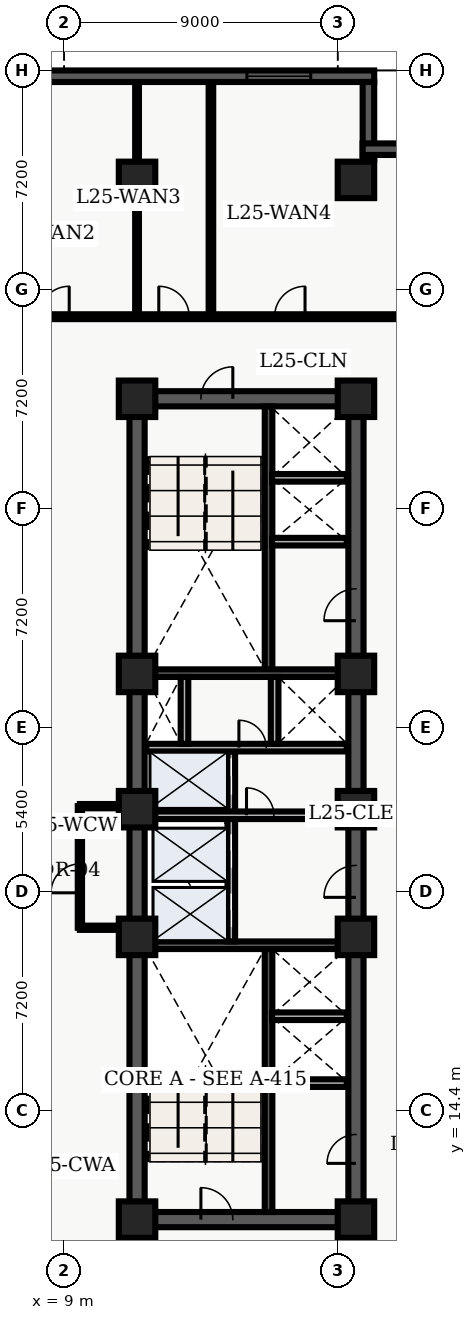
"""IFC4 building model, lengths in metres.
Left out: names, types, materials, properties, quantities, classifications, styles, units other than length and angle.
Written with IfcOpenShell. Run it as: python <this file> out.ifc"""

import sys

from ifc_helpers import new_model, entity, si_unit, converted_unit, direction, frame, origin_with_axes, origin_2d_with_axis, place, context, subcontext, project, spatial, polyline, rectangle, outline, extrude, element, fill, save


model = new_model("IFC4")
c1 = context("Model", 3, precision=1e-05, world=origin_with_axes(), true_north=direction((0.0, 1.0)))
c2 = subcontext(c1, "Body", "Model", "MODEL_VIEW")
j1 = project(units=[si_unit("LENGTHUNIT", "METRE"), converted_unit("PLANEANGLEUNIT", "DEGREE", entity("IfcPlaneAngleMeasure", 0.017), si_unit("PLANEANGLEUNIT", "RADIAN"), dimensions=[0, 0, 0, 0, 0, 0, 0])], contexts=[c1])
p1 = place(None, origin_with_axes())
s1 = spatial("IfcSite", under=j1, at=p1, CompositionType="ELEMENT")
p2 = place(p1, origin_with_axes())
s2 = spatial("IfcBuilding", under=s1, at=p2, CompositionType="ELEMENT")
p3 = place(p2, frame((0.0, 0.0, 104.7), z_axis=(0.0, 0.0, 1.0), x_axis=(1.0, 0.0, 0.0)))
s3 = spatial("IfcBuildingStorey", under=s2, at=p3, CompositionType="ELEMENT", Elevation=104.7)
p4 = place(p3, frame((11.4, 10.8, 0.0), z_axis=(0.0, 0.0, 1.0), x_axis=(0.0, 1.0, 0.0)))
e1 = element("IfcWall", 1, at=p4, inside=s3, PredefinedType="SHEAR", context=c2, shape_type="SweptSolid", body=[
    extrude(outline(polyline([(0.0, -0.25), (27.0, -0.25), (27.0, 0.25), (0.0, 0.25), (0.0, -0.25)])), origin_with_axes(), (0.0, 0.0, 1.0), 3.66),
])
p5 = place(p3, frame((11.4, 10.8, 0.0), z_axis=(0.0, 0.0, 1.0), x_axis=(1.0, 0.0, 0.0)))
e2 = element("IfcWall", 2, at=p5, inside=s3, PredefinedType="SHEAR", context=c2, shape_type="SweptSolid", body=[
    extrude(outline(polyline([(0.0, -0.25), (7.2, -0.25), (7.2, 0.25), (0.0, 0.25), (0.0, -0.25)])), origin_with_axes(), (0.0, 0.0, 1.0), 3.66),
])
p6 = place(p5, frame((2.625, 0.0, 0.0), z_axis=(0.0, 0.0, 1.0), x_axis=(1.0, 0.0, 0.0)))
e3 = element("IfcOpeningElement", 3, at=p6, cuts=e2, PredefinedType="OPENING", context=c2, shape_type="SweptSolid", body=[
    extrude(rectangle(XDim=1.05, YDim=0.52, at=origin_2d_with_axis()), origin_with_axes(), (0.0, 0.0, 1.0), 2.15),
])
p7 = place(p3, frame((11.4, 37.8, 0.0), z_axis=(0.0, 0.0, 1.0), x_axis=(1.0, 0.0, 0.0)))
e4 = element("IfcWall", 4, at=p7, inside=s3, PredefinedType="SHEAR", context=c2, shape_type="SweptSolid", body=[
    extrude(outline(polyline([(0.0, -0.25), (7.2, -0.25), (7.2, 0.25), (0.0, 0.25), (0.0, -0.25)])), origin_with_axes(), (0.0, 0.0, 1.0), 3.66),
])
p8 = place(p7, frame((2.625, 0.0, 0.0), z_axis=(0.0, 0.0, 1.0), x_axis=(1.0, 0.0, 0.0)))
e5 = element("IfcOpeningElement", 5, at=p8, cuts=e4, PredefinedType="OPENING", context=c2, shape_type="SweptSolid", body=[
    extrude(rectangle(XDim=1.05, YDim=0.52, at=origin_2d_with_axis()), origin_with_axes(), (0.0, 0.0, 1.0), 2.15),
])
p9 = place(p3, frame((18.6, 10.8, 0.0), z_axis=(0.0, 0.0, 1.0), x_axis=(0.0, 1.0, 0.0)))
e6 = element("IfcWall", 6, at=p9, inside=s3, PredefinedType="SHEAR", context=c2, shape_type="SweptSolid", body=[
    extrude(outline(polyline([(0.0, -0.25), (13.5, -0.25), (13.5, 0.25), (0.0, 0.25), (0.0, -0.25)])), origin_with_axes(), (0.0, 0.0, 1.0), 3.66),
])
p10 = place(p9, frame((11.125, 0.0, 0.0), z_axis=(0.0, 0.0, 1.0), x_axis=(1.0, 0.0, 0.0)))
e7 = element("IfcOpeningElement", 7, at=p10, cuts=e6, PredefinedType="OPENING", context=c2, shape_type="SweptSolid", body=[
    extrude(rectangle(XDim=1.05, YDim=0.52, at=origin_2d_with_axis()), origin_with_axes(), (0.0, 0.0, 1.0), 2.15),
])
p11 = place(p9, frame((2.325, 0.0, 0.0), z_axis=(0.0, 0.0, 1.0), x_axis=(1.0, 0.0, 0.0)))
e8 = element("IfcOpeningElement", 8, at=p11, cuts=e6, PredefinedType="OPENING", context=c2, shape_type="SweptSolid", body=[
    extrude(rectangle(XDim=0.95, YDim=0.52, at=origin_2d_with_axis()), origin_with_axes(), (0.0, 0.0, 1.0), 2.15),
])
p12 = place(p3, frame((18.6, 24.3, 0.0), z_axis=(0.0, 0.0, 1.0), x_axis=(0.0, 1.0, 0.0)))
e9 = element("IfcWall", 9, at=p12, inside=s3, PredefinedType="SHEAR", context=c2, shape_type="SweptSolid", body=[
    extrude(outline(polyline([(0.0, -0.25), (13.5, -0.25), (13.5, 0.25), (0.0, 0.25), (0.0, -0.25)])), origin_with_axes(), (0.0, 0.0, 1.0), 3.66),
])
p13 = place(p12, frame((6.725, 0.0, 0.0), z_axis=(0.0, 0.0, 1.0), x_axis=(1.0, 0.0, 0.0)))
e10 = element("IfcOpeningElement", 10, at=p13, cuts=e9, PredefinedType="OPENING", context=c2, shape_type="SweptSolid", body=[
    extrude(rectangle(XDim=1.05, YDim=0.52, at=origin_2d_with_axis()), origin_with_axes(), (0.0, 0.0, 1.0), 2.15),
])
p14 = place(p3, frame((15.725, 11.05, 0.0), z_axis=(0.0, 0.0, 1.0), x_axis=(0.0, 1.0, 0.0)))
e11 = element("IfcWall", 11, at=p14, inside=s3, PredefinedType="SHEAR", context=c2, shape_type="SweptSolid", body=[
    extrude(outline(polyline([(0.0, -0.125), (8.65, -0.125), (8.65, 0.125), (0.0, 0.125), (0.0, -0.125)])), origin_with_axes(), (0.0, 0.0, 1.0), 3.66),
])
p15 = place(p3, frame((11.65, 19.825, 0.0), z_axis=(0.0, 0.0, 1.0), x_axis=(1.0, 0.0, 0.0)))
e12 = element("IfcWall", 12, at=p15, inside=s3, PredefinedType="SHEAR", context=c2, shape_type="SweptSolid", body=[
    extrude(outline(polyline([(0.0, -0.125), (6.7, -0.125), (6.7, 0.125), (0.0, 0.125), (0.0, -0.125)])), origin_with_axes(), (0.0, 0.0, 1.0), 3.66),
])
p16 = place(p3, frame((15.725, 28.9, 0.0), z_axis=(0.0, 0.0, 1.0), x_axis=(0.0, 1.0, 0.0)))
e13 = element("IfcWall", 13, at=p16, inside=s3, PredefinedType="SHEAR", context=c2, shape_type="SweptSolid", body=[
    extrude(outline(polyline([(0.0, -0.125), (8.65, -0.125), (8.65, 0.125), (0.0, 0.125), (0.0, -0.125)])), origin_with_axes(), (0.0, 0.0, 1.0), 3.66),
])
p17 = place(p3, frame((11.65, 28.775, 0.0), z_axis=(0.0, 0.0, 1.0), x_axis=(1.0, 0.0, 0.0)))
e14 = element("IfcWall", 14, at=p17, inside=s3, PredefinedType="SHEAR", context=c2, shape_type="SweptSolid", body=[
    extrude(outline(polyline([(0.0, -0.125), (6.7, -0.125), (6.7, 0.125), (0.0, 0.125), (0.0, -0.125)])), origin_with_axes(), (0.0, 0.0, 1.0), 3.66),
])
p18 = place(p3, frame((14.5, 19.95, 0.0), z_axis=(0.0, 0.0, 1.0), x_axis=(0.0, 1.0, 0.0)))
e15 = element("IfcWall", 15, at=p18, inside=s3, PredefinedType="SOLIDWALL", context=c2, shape_type="SweptSolid", body=[
    extrude(outline(polyline([(0.0, -0.125), (6.25, -0.125), (6.25, 0.125), (0.0, 0.125), (0.0, -0.125)])), origin_with_axes(), (0.0, 0.0, 1.0), 2.7),
])
p19 = place(p18, frame((1.025, 0.0, 0.0), z_axis=(0.0, 0.0, 1.0), x_axis=(1.0, 0.0, 0.0)))
e16 = element("IfcOpeningElement", 16, at=p19, cuts=e15, PredefinedType="OPENING", context=c2, shape_type="SweptSolid", body=[
    extrude(rectangle(XDim=1.1, YDim=0.27, at=origin_2d_with_axis()), origin_with_axes(), (0.0, 0.0, 1.0), 2.15),
])
p20 = place(p18, frame((2.975, 0.0, 0.0), z_axis=(0.0, 0.0, 1.0), x_axis=(1.0, 0.0, 0.0)))
e17 = element("IfcOpeningElement", 17, at=p20, cuts=e15, PredefinedType="OPENING", context=c2, shape_type="SweptSolid", body=[
    extrude(rectangle(XDim=1.1, YDim=0.27, at=origin_2d_with_axis()), origin_with_axes(), (0.0, 0.0, 1.0), 2.15),
])
p21 = place(p18, frame((5.425, 0.0, 0.0), z_axis=(0.0, 0.0, 1.0), x_axis=(1.0, 0.0, 0.0)))
e18 = element("IfcOpeningElement", 18, at=p21, cuts=e15, PredefinedType="OPENING", context=c2, shape_type="SweptSolid", body=[
    extrude(rectangle(XDim=1.2, YDim=0.27, at=origin_2d_with_axis()), origin_with_axes(), (0.0, 0.0, 1.0), 2.15),
])
p22 = place(p3, frame((11.7, 24.1, 0.0), z_axis=(0.0, 0.0, 1.0), x_axis=(1.0, 0.0, 0.0)))
e19 = element("IfcWall", 19, at=p22, inside=s3, PredefinedType="SOLIDWALL", context=c2, shape_type="SweptSolid", body=[
    extrude(outline(polyline([(0.0, -0.125), (6.6, -0.125), (6.6, 0.125), (0.0, 0.125), (0.0, -0.125)])), origin_with_axes(), (0.0, 0.0, 1.0), 2.7),
])
p23 = place(p22, frame((3.75, 0.0, 0.0), z_axis=(0.0, 0.0, 1.0), x_axis=(1.0, 0.0, 0.0)))
e20 = element("IfcOpeningElement", 20, at=p23, cuts=e19, PredefinedType="OPENING", context=c2, shape_type="SweptSolid", body=[
    extrude(rectangle(XDim=0.9, YDim=0.27, at=origin_2d_with_axis()), origin_with_axes(), (0.0, 0.0, 1.0), 2.15),
])
p24 = place(p3, frame((11.7, 26.325, 0.0), z_axis=(0.0, 0.0, 1.0), x_axis=(1.0, 0.0, 0.0)))
e21 = element("IfcWall", 21, at=p24, inside=s3, PredefinedType="SOLIDWALL", context=c2, shape_type="SweptSolid", body=[
    extrude(outline(polyline([(0.0, -0.125), (6.6, -0.125), (6.6, 0.125), (0.0, 0.125), (0.0, -0.125)])), origin_with_axes(), (0.0, 0.0, 1.0), 2.7),
])
p25 = place(p24, frame((3.5, 0.0, 0.0), z_axis=(0.0, 0.0, 1.0), x_axis=(1.0, 0.0, 0.0)))
e22 = element("IfcOpeningElement", 22, at=p25, cuts=e21, PredefinedType="OPENING", context=c2, shape_type="SweptSolid", body=[
    extrude(rectangle(XDim=0.9, YDim=0.27, at=origin_2d_with_axis()), origin_with_axes(), (0.0, 0.0, 1.0), 2.15),
])
for number, where, z_axis, x_axis in (
    (23, (12.96, 26.45, 0.0), (0.0, 0.0, 1.0), (0.0, 1.0, 0.0)),
    (24, (15.925, 26.45, 0.0), (0.0, 0.0, 1.0), (0.0, 1.0, 0.0)),
):
    element("IfcWall", number, at=place(p3, frame(where, z_axis=z_axis, x_axis=x_axis)), inside=s3, PredefinedType="SOLIDWALL", context=c2, shape_type="SweptSolid", body=[
        extrude(outline(polyline([(0.0, -0.125), (2.2, -0.125), (2.2, 0.125), (0.0, 0.125), (0.0, -0.125)])), origin_with_axes(), (0.0, 0.0, 1.0), 2.7),
    ])
for number, where, z_axis, x_axis in (
    (25, (11.4, 10.8, 0.0), (0.0, 0.0, 1.0), (1.0, 0.0, 0.0)),
    (26, (11.4, 20.1, 0.0), (0.0, 0.0, 1.0), (1.0, 0.0, 0.0)),
    (27, (11.4, 24.3, 0.0), (0.0, 0.0, 1.0), (1.0, 0.0, 0.0)),
    (28, (11.4, 28.75, 0.0), (0.0, 0.0, 1.0), (1.0, 0.0, 0.0)),
    (29, (11.4, 37.8, 0.0), (0.0, 0.0, 1.0), (1.0, 0.0, 0.0)),
    (30, (11.4, 45.0, 0.0), (0.0, 0.0, 1.0), (1.0, 0.0, 0.0)),
    (31, (18.6, 10.8, 0.0), (0.0, 0.0, 1.0), (1.0, 0.0, 0.0)),
    (32, (18.6, 20.1, 0.0), (0.0, 0.0, 1.0), (1.0, 0.0, 0.0)),
    (33, (18.6, 24.3, 0.0), (0.0, 0.0, 1.0), (1.0, 0.0, 0.0)),
    (34, (18.6, 28.75, 0.0), (0.0, 0.0, 1.0), (1.0, 0.0, 0.0)),
    (35, (18.6, 37.8, 0.0), (0.0, 0.0, 1.0), (1.0, 0.0, 0.0)),
    (36, (18.6, 45.0, 0.0), (0.0, 0.0, 1.0), (1.0, 0.0, 0.0)),
):
    element("IfcColumn", number, at=place(p3, frame(where, z_axis=z_axis, x_axis=x_axis)), inside=s3, PredefinedType="COLUMN", context=c2, shape_type="SweptSolid", body=[
        extrude(rectangle(XDim=1.2, YDim=1.2, at=origin_2d_with_axis()), origin_with_axes(), (0.0, 0.0, 1.0), 3.9),
    ])
for number, where, z_axis, x_axis in (
    (37, (15.84, 15.29, 0.0), (0.0, 0.0, 1.0), (1.0, 0.0, 0.0)),
    (38, (15.84, 17.49, 0.0), (0.0, 0.0, 1.0), (1.0, 0.0, 0.0)),
    (39, (15.84, 33.1, 0.0), (0.0, 0.0, 1.0), (1.0, 0.0, 0.0)),
    (40, (15.84, 35.2, 0.0), (0.0, 0.0, 1.0), (1.0, 0.0, 0.0)),
):
    element("IfcWall", number, at=place(p3, frame(where, z_axis=z_axis, x_axis=x_axis)), inside=s3, PredefinedType="SOLIDWALL", context=c2, shape_type="SweptSolid", body=[
        extrude(outline(polyline([(0.0, -0.125), (2.46, -0.125), (2.46, 0.125), (0.0, 0.125), (0.0, -0.125)])), origin_with_axes(), (0.0, 0.0, 1.0), 2.7),
    ])
p26 = place(p3, frame((9.52, 20.4, 0.0), z_axis=(0.0, 0.0, 1.0), x_axis=(0.0, 1.0, 0.0)))
e41 = element("IfcWall", 41, at=p26, inside=s3, PredefinedType="PARTITIONING", context=c2, shape_type="SweptSolid", body=[
    extrude(outline(polyline([(0.0, -0.07), (4.0, -0.07), (4.0, 0.07), (0.0, 0.07), (0.0, -0.07)])), origin_with_axes(), (0.0, 0.0, 1.0), 2.7),
])
p27 = place(p26, frame((1.625, 0.0, 0.0), z_axis=(0.0, 0.0, 1.0), x_axis=(1.0, 0.0, 0.0)))
e42 = element("IfcOpeningElement", 42, at=p27, cuts=e41, PredefinedType="OPENING", context=c2, shape_type="SweptSolid", body=[
    extrude(rectangle(XDim=0.95, YDim=0.16, at=origin_2d_with_axis()), origin_with_axes(), (0.0, 0.0, 1.0), 2.15),
])
for number, where, z_axis, x_axis in (
    (43, (9.52, 20.4, 0.0), (0.0, 0.0, 1.0), (1.0, 0.0, 0.0)),
    (44, (9.52, 24.4, 0.0), (0.0, 0.0, 1.0), (1.0, 0.0, 0.0)),
):
    element("IfcWall", number, at=place(p3, frame(where, z_axis=z_axis, x_axis=x_axis)), inside=s3, PredefinedType="PARTITIONING", context=c2, shape_type="SweptSolid", body=[
        extrude(outline(polyline([(0.0, -0.07), (1.58, -0.07), (1.58, 0.07), (0.0, 0.07), (0.0, -0.07)])), origin_with_axes(), (0.0, 0.0, 1.0), 2.7),
    ])
p28 = place(p3, frame((2.6, 40.5, 0.0), z_axis=(0.0, 0.0, 1.0), x_axis=(1.0, 0.0, 0.0)))
e45 = element("IfcWall", 45, at=p28, inside=s3, PredefinedType="PARTITIONING", context=c2, shape_type="SweptSolid", body=[
    extrude(outline(polyline([(0.0, -0.08), (18.65, -0.08), (18.65, 0.08), (0.0, 0.08), (0.0, -0.08)])), origin_with_axes(), (0.0, 0.0, 1.0), 2.7),
])
p29 = place(p28, frame((1.663, 0.0, 0.0), z_axis=(0.0, 0.0, 1.0), x_axis=(1.0, 0.0, 0.0)))
e46 = element("IfcOpeningElement", 46, at=p29, cuts=e45, PredefinedType="OPENING", context=c2, shape_type="SweptSolid", body=[
    extrude(rectangle(XDim=1.0, YDim=0.18, at=origin_2d_with_axis()), origin_with_axes(), (0.0, 0.0, 1.0), 2.15),
])
p30 = place(p28, frame((6.069, 0.0, 0.0), z_axis=(0.0, 0.0, 1.0), x_axis=(1.0, 0.0, 0.0)))
e47 = element("IfcOpeningElement", 47, at=p30, cuts=e45, PredefinedType="OPENING", context=c2, shape_type="SweptSolid", body=[
    extrude(rectangle(XDim=1.0, YDim=0.18, at=origin_2d_with_axis()), origin_with_axes(), (0.0, 0.0, 1.0), 2.15),
])
p31 = place(p28, frame((10.015, 0.0, 0.0), z_axis=(0.0, 0.0, 1.0), x_axis=(1.0, 0.0, 0.0)))
e48 = element("IfcOpeningElement", 48, at=p31, cuts=e45, PredefinedType="OPENING", context=c2, shape_type="SweptSolid", body=[
    extrude(rectangle(XDim=1.0, YDim=0.18, at=origin_2d_with_axis()), origin_with_axes(), (0.0, 0.0, 1.0), 2.15),
])
p32 = place(p28, frame((13.825, 0.0, 0.0), z_axis=(0.0, 0.0, 1.0), x_axis=(1.0, 0.0, 0.0)))
e49 = element("IfcOpeningElement", 49, at=p32, cuts=e45, PredefinedType="OPENING", context=c2, shape_type="SweptSolid", body=[
    extrude(rectangle(XDim=1.0, YDim=0.18, at=origin_2d_with_axis()), origin_with_axes(), (0.0, 0.0, 1.0), 2.15),
])
p33 = place(p3, frame((11.4, 40.6, 0.0), z_axis=(0.0, 0.0, 1.0), x_axis=(0.0, 1.0, 0.0)))
e50 = element("IfcWall", 50, at=p33, inside=s3, PredefinedType="PARTITIONING", context=c2, shape_type="SweptSolid", body=[
    extrude(outline(polyline([(0.0, -0.062), (7.64, -0.062), (7.64, 0.062), (0.0, 0.062), (0.0, -0.062)])), origin_with_axes(), (0.0, 0.0, 1.0), 2.7),
])
p34 = place(p3, frame((13.83, 40.6, 0.0), z_axis=(0.0, 0.0, 1.0), x_axis=(0.0, 1.0, 0.0)))
e51 = element("IfcWall", 51, at=p34, inside=s3, PredefinedType="PARTITIONING", context=c2, shape_type="SweptSolid", body=[
    extrude(outline(polyline([(0.0, -0.075), (7.64, -0.075), (7.64, 0.075), (0.0, 0.075), (0.0, -0.075)])), origin_with_axes(), (0.0, 0.0, 1.0), 2.7),
])
p35 = place(p3, frame((2.78, 48.41, 0.0), z_axis=(0.0, 0.0, 1.0), x_axis=(1.0, 0.0, 0.0)))
e52 = element("IfcWall", 52, at=p35, inside=s3, PredefinedType="SOLIDWALL", context=c2, shape_type="SweptSolid", body=[
    extrude(outline(polyline([(0.0, -0.19), (16.42, -0.19), (16.42, 0.19), (0.0, 0.19), (0.0, -0.19)])), origin_with_axes(), (0.0, 0.0, 1.0), 3.66),
])
p36 = place(p35, frame((13.283, 0.0, 0.45), z_axis=(0.0, 0.0, 1.0), x_axis=(1.0, 0.0, 0.0)))
e53 = element("IfcOpeningElement", 53, at=p36, cuts=e52, PredefinedType="OPENING", context=c2, shape_type="SweptSolid", body=[
    extrude(rectangle(XDim=2.1, YDim=0.4, at=origin_2d_with_axis()), origin_with_axes(), (0.0, 0.0, 1.0), 2.2),
])
p37 = place(p3, frame((19.01, 48.22, 0.0), z_axis=(0.0, 0.0, 1.0), x_axis=(0.0, -1.0, 0.0)))
e54 = element("IfcWall", 54, at=p37, inside=s3, PredefinedType="SOLIDWALL", context=c2, shape_type="SweptSolid", body=[
    extrude(outline(polyline([(0.0, -0.19), (2.56, -0.19), (2.56, 0.19), (0.0, 0.19), (0.0, -0.19)])), origin_with_axes(), (0.0, 0.0, 1.0), 3.66),
])
p38 = place(p3, frame((18.82, 46.01, 0.0), z_axis=(0.0, 0.0, 1.0), x_axis=(1.0, 0.0, 0.0)))
e55 = element("IfcWall", 55, at=p38, inside=s3, PredefinedType="SOLIDWALL", context=c2, shape_type="SweptSolid", body=[
    extrude(outline(polyline([(0.0, -0.19), (2.78, -0.19), (2.78, 0.19), (0.0, 0.19), (0.0, -0.19)])), origin_with_axes(), (0.0, 0.0, 1.0), 3.66),
])
p39 = place(p18, frame((1.025, 0.0, 0.0), z_axis=(0.0, 0.0, 1.0), x_axis=(1.0, 0.0, 0.0)))
e56 = element("IfcDoor", 56, at=p39, inside=s3, OperationType="SLIDING_TO_LEFT", PredefinedType="DOOR", context=c2, shape_type="SweptSolid", body=[
    extrude(rectangle(XDim=1.1, YDim=0.09, at=origin_2d_with_axis()), origin_with_axes(), (0.0, 0.0, 1.0), 2.15),
])
fill(e16, e56)
p40 = place(p18, frame((2.975, 0.0, 0.0), z_axis=(0.0, 0.0, 1.0), x_axis=(1.0, 0.0, 0.0)))
e57 = element("IfcDoor", 57, at=p40, inside=s3, OperationType="SLIDING_TO_RIGHT", PredefinedType="DOOR", context=c2, shape_type="SweptSolid", body=[
    extrude(rectangle(XDim=1.1, YDim=0.09, at=origin_2d_with_axis()), origin_with_axes(), (0.0, 0.0, 1.0), 2.15),
])
fill(e17, e57)
p41 = place(p18, frame((5.425, 0.0, 0.0), z_axis=(0.0, 0.0, 1.0), x_axis=(1.0, 0.0, 0.0)))
e58 = element("IfcDoor", 58, at=p41, inside=s3, OperationType="DOUBLE_DOOR_SLIDING", PredefinedType="DOOR", context=c2, shape_type="SweptSolid", body=[
    extrude(rectangle(XDim=1.2, YDim=0.09, at=origin_2d_with_axis()), origin_with_axes(), (0.0, 0.0, 1.0), 2.15),
])
fill(e18, e58)
p42 = place(p5, frame((2.625, 0.0, 0.0), z_axis=(0.0, 0.0, 1.0), x_axis=(1.0, 0.0, 0.0)))
e59 = element("IfcDoor", 59, at=p42, inside=s3, OperationType="SINGLE_SWING_LEFT", PredefinedType="DOOR", context=c2, shape_type="SweptSolid", body=[
    extrude(rectangle(XDim=1.05, YDim=0.09, at=origin_2d_with_axis()), origin_with_axes(), (0.0, 0.0, 1.0), 2.15),
])
fill(e3, e59)
p43 = place(p7, frame((2.625, 0.0, 0.0), z_axis=(0.0, 0.0, 1.0), x_axis=(1.0, 0.0, 0.0)))
e60 = element("IfcDoor", 60, at=p43, inside=s3, OperationType="SINGLE_SWING_RIGHT", PredefinedType="DOOR", context=c2, shape_type="SweptSolid", body=[
    extrude(rectangle(XDim=1.05, YDim=0.09, at=origin_2d_with_axis()), origin_with_axes(), (0.0, 0.0, 1.0), 2.15),
])
fill(e5, e60)
p44 = place(p9, frame((11.125, 0.0, 0.0), z_axis=(0.0, 0.0, 1.0), x_axis=(1.0, 0.0, 0.0)))
e61 = element("IfcDoor", 61, at=p44, inside=s3, OperationType="SINGLE_SWING_LEFT", PredefinedType="DOOR", context=c2, shape_type="SweptSolid", body=[
    extrude(rectangle(XDim=1.05, YDim=0.09, at=origin_2d_with_axis()), origin_with_axes(), (0.0, 0.0, 1.0), 2.15),
])
fill(e7, e61)
p45 = place(p22, frame((3.75, 0.0, 0.0), z_axis=(0.0, 0.0, 1.0), x_axis=(1.0, 0.0, 0.0)))
e62 = element("IfcDoor", 62, at=p45, inside=s3, OperationType="SINGLE_SWING_LEFT", PredefinedType="DOOR", context=c2, shape_type="SweptSolid", body=[
    extrude(rectangle(XDim=0.9, YDim=0.09, at=origin_2d_with_axis()), origin_with_axes(), (0.0, 0.0, 1.0), 2.15),
])
fill(e20, e62)
p46 = place(p24, frame((3.5, 0.0, 0.0), z_axis=(0.0, 0.0, 1.0), x_axis=(1.0, 0.0, 0.0)))
e63 = element("IfcDoor", 63, at=p46, inside=s3, OperationType="SINGLE_SWING_LEFT", PredefinedType="DOOR", context=c2, shape_type="SweptSolid", body=[
    extrude(rectangle(XDim=0.9, YDim=0.09, at=origin_2d_with_axis()), origin_with_axes(), (0.0, 0.0, 1.0), 2.15),
])
fill(e22, e63)
p47 = place(p9, frame((2.325, 0.0, 0.0), z_axis=(0.0, 0.0, 1.0), x_axis=(1.0, 0.0, 0.0)))
e64 = element("IfcDoor", 64, at=p47, inside=s3, OperationType="SINGLE_SWING_LEFT", PredefinedType="DOOR", context=c2, shape_type="SweptSolid", body=[
    extrude(rectangle(XDim=0.95, YDim=0.09, at=origin_2d_with_axis()), origin_with_axes(), (0.0, 0.0, 1.0), 2.15),
])
fill(e8, e64)
p48 = place(p12, frame((6.725, 0.0, 0.0), z_axis=(0.0, 0.0, 1.0), x_axis=(1.0, 0.0, 0.0)))
e65 = element("IfcDoor", 65, at=p48, inside=s3, OperationType="SINGLE_SWING_LEFT", PredefinedType="DOOR", context=c2, shape_type="SweptSolid", body=[
    extrude(rectangle(XDim=1.05, YDim=0.09, at=origin_2d_with_axis()), origin_with_axes(), (0.0, 0.0, 1.0), 2.15),
])
fill(e10, e65)
p49 = place(p26, frame((1.625, 0.0, 0.0), z_axis=(0.0, 0.0, 1.0), x_axis=(1.0, 0.0, 0.0)))
e66 = element("IfcDoor", 66, at=p49, inside=s3, OperationType="SINGLE_SWING_LEFT", PredefinedType="DOOR", context=c2, shape_type="SweptSolid", body=[
    extrude(rectangle(XDim=0.95, YDim=0.084, at=origin_2d_with_axis()), origin_with_axes(), (0.0, 0.0, 1.0), 2.15),
])
fill(e42, e66)
p50 = place(p28, frame((6.069, 0.0, 0.0), z_axis=(0.0, 0.0, 1.0), x_axis=(1.0, 0.0, 0.0)))
e67 = element("IfcDoor", 67, at=p50, inside=s3, OperationType="SINGLE_SWING_RIGHT", PredefinedType="DOOR", context=c2, shape_type="SweptSolid", body=[
    extrude(rectangle(XDim=1.0, YDim=0.09, at=origin_2d_with_axis()), origin_with_axes(), (0.0, 0.0, 1.0), 2.15),
])
fill(e47, e67)
p51 = place(p28, frame((10.015, 0.0, 0.0), z_axis=(0.0, 0.0, 1.0), x_axis=(1.0, 0.0, 0.0)))
e68 = element("IfcDoor", 68, at=p51, inside=s3, OperationType="SINGLE_SWING_LEFT", PredefinedType="DOOR", context=c2, shape_type="SweptSolid", body=[
    extrude(rectangle(XDim=1.0, YDim=0.09, at=origin_2d_with_axis()), origin_with_axes(), (0.0, 0.0, 1.0), 2.15),
])
fill(e48, e68)
p52 = place(p28, frame((13.825, 0.0, 0.0), z_axis=(0.0, 0.0, 1.0), x_axis=(1.0, 0.0, 0.0)))
e69 = element("IfcDoor", 69, at=p52, inside=s3, OperationType="SINGLE_SWING_RIGHT", PredefinedType="DOOR", context=c2, shape_type="SweptSolid", body=[
    extrude(rectangle(XDim=1.0, YDim=0.09, at=origin_2d_with_axis()), origin_with_axes(), (0.0, 0.0, 1.0), 2.15),
])
fill(e49, e69)
p53 = place(p35, frame((13.283, 0.0, 0.45), z_axis=(0.0, 0.0, 1.0), x_axis=(1.0, 0.0, 0.0)))
e70 = element("IfcWindow", 70, at=p53, inside=s3, PredefinedType="WINDOW", context=c2, shape_type="SweptSolid", body=[
    extrude(rectangle(XDim=2.1, YDim=0.09, at=origin_2d_with_axis()), origin_with_axes(), (0.0, 0.0, 1.0), 2.2),
])
fill(e53, e70)
save(model, sys.argv[1])
